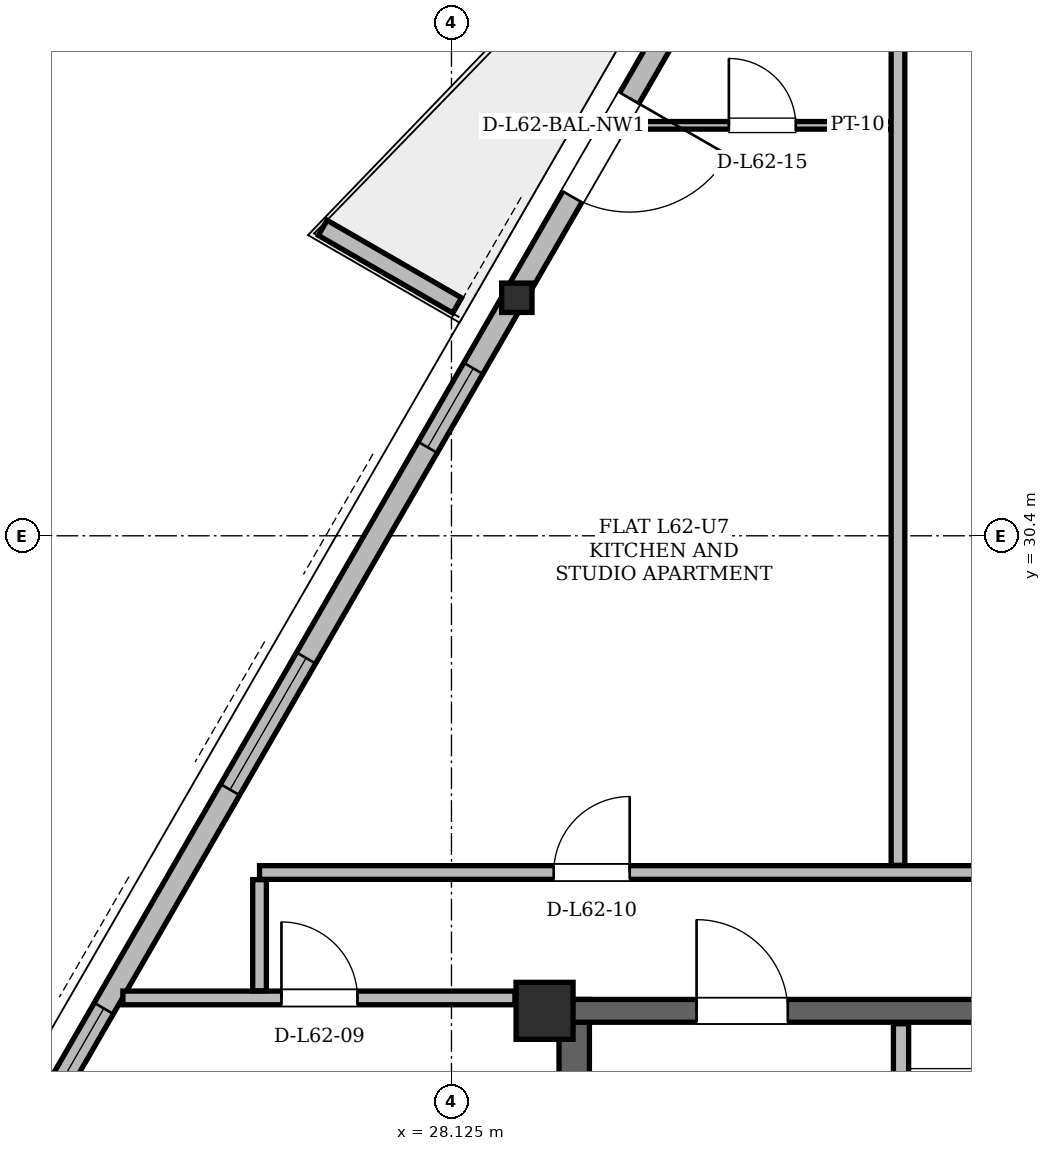
"""IFC4 building model, lengths in metres.
Left out: names, types, materials, properties, quantities, classifications, styles, units other than length and angle.
Written with IfcOpenShell. Run it as: python <this file> out.ifc"""

import sys

from ifc_helpers import new_model, si_unit, direction, frame, frame_2d, origin, origin_2d, place, context, subcontext, project, spatial, polyline, rectangle, hollow_rectangle, i_section, outline, extrude, element, fill, save


model = new_model("IFC4")
c1 = context("Model", 3, precision=1e-05, world=origin(), true_north=direction((0.0, 1.0)))
c2 = subcontext(c1, "Body", "Model", "MODEL_VIEW")
j1 = project(units=[si_unit("LENGTHUNIT", "METRE"), si_unit("PLANEANGLEUNIT", "RADIAN")], contexts=[c1])
p1 = place(None, origin())
s1 = spatial("IfcSite", under=j1, at=p1, CompositionType="ELEMENT")
p2 = place(p1, origin())
s2 = spatial("IfcBuilding", under=s1, at=p2, CompositionType="ELEMENT")
p3 = place(p2, frame((0.0, 0.0, 234.3)))
s3 = spatial("IfcBuildingStorey", under=s2, at=p3, CompositionType="ELEMENT", Elevation=234.3)
p4 = place(p3, frame((29.35, 24.15, 0.0), z_axis=(0.0, 0.0, 1.0), x_axis=(1.0, 0.0, 0.0)))
e1 = element("IfcColumn", 1, at=p4, inside=s3, PredefinedType="COLUMN", context=c2, shape_type="SweptSolid", body=[
    extrude(hollow_rectangle(XDim=0.75, YDim=0.75, WallThickness=0.06, at=origin_2d()), origin(), (0.0, 0.0, 1.0), 3.6),
])
p5 = place(p3, frame((28.955, 33.543, 0.004), z_axis=(0.016857685475, -0.006389606591, 0.999837482478), x_axis=(0.354426896262, 0.935083726308, 0.0)))
e2 = element("IfcColumn", 2, at=p5, inside=s3, PredefinedType="COLUMN", context=c2, shape_type="SweptSolid", body=[
    extrude(i_section(OverallWidth=0.399, OverallDepth=0.386, WebThickness=0.021, FlangeThickness=0.033, at=origin_2d()), origin(), (0.0, 0.0, 1.0), 3.592),
])
p6 = place(p3, frame((29.74, 11.0, 0.0), z_axis=(0.0, 0.0, 1.0), x_axis=(0.0, 1.0, 0.0)))
e3 = element("IfcWall", 3, at=p6, inside=s3, PredefinedType="SHEAR", context=c2, shape_type="SweptSolid", body=[
    extrude(rectangle(XDim=13.3, YDim=0.4, at=frame_2d((6.65, 0.0))), origin(), (0.0, 0.0, 1.0), 3.38),
])
p7 = place(p3, frame((29.65, 24.15, 0.0), z_axis=(0.0, 0.0, 1.0), x_axis=(1.0, 0.0, 0.0)))
e4 = element("IfcWall", 4, at=p7, inside=s3, PredefinedType="SHEAR", context=c2, shape_type="SweptSolid", body=[
    extrude(rectangle(XDim=15.7, YDim=0.3, at=frame_2d((7.85, 0.0))), origin(), (0.0, 0.0, 1.0), 3.38),
])
p8 = place(p7, frame((1.7, 0.0, 0.0)))
e5 = element("IfcOpeningElement", 5, at=p8, cuts=e4, PredefinedType="OPENING", context=c2, shape_type="SweptSolid", body=[
    extrude(rectangle(XDim=1.2, YDim=2.2, at=frame_2d((0.6, 1.1))), frame((0.0, 0.15, 0.0), z_axis=(0.0, -1.0, 0.0), x_axis=(1.0, 0.0, 0.0)), (0.0, 0.0, 1.0), 0.3),
])
p9 = place(p7, frame((12.8, 0.0, 0.0)))
e6 = element("IfcOpeningElement", 6, at=p9, cuts=e4, PredefinedType="OPENING", context=c2, shape_type="SweptSolid", body=[
    extrude(rectangle(XDim=1.2, YDim=2.2, at=frame_2d((0.6, 1.1))), frame((0.0, 0.15, 0.0), z_axis=(0.0, -1.0, 0.0), x_axis=(1.0, 0.0, 0.0)), (0.0, 0.0, 1.0), 0.3),
])
p10 = place(p7, frame((7.4, 0.0, 0.0)))
e7 = element("IfcOpeningElement", 7, at=p10, cuts=e4, PredefinedType="OPENING", context=c2, shape_type="SweptSolid", body=[
    extrude(rectangle(XDim=0.9, YDim=2.05, at=frame_2d((0.45, 1.025))), frame((0.0, 0.15, 0.0), z_axis=(0.0, -1.0, 0.0), x_axis=(1.0, 0.0, 0.0)), (0.0, 0.0, 1.0), 0.3),
])
p11 = place(p3, frame((34.482, 43.116, 0.0), z_axis=(0.0, 0.0, 1.0), x_axis=(-0.500000614513, -0.866025048995, 0.0)))
e8 = element("IfcWall", 8, at=p11, inside=s3, PredefinedType="SOLIDWALL", context=c2, shape_type="SweptSolid", body=[
    extrude(rectangle(XDim=36.848, YDim=0.29, at=frame_2d((18.424, 0.0))), origin(), (0.0, 0.0, 1.0), 2.677),
])
p12 = place(p11, frame((8.034, 0.0, 0.0)))
e9 = element("IfcOpeningElement", 9, at=p12, cuts=e8, PredefinedType="OPENING", context=c2, shape_type="SweptSolid", body=[
    extrude(rectangle(XDim=1.5, YDim=2.2, at=frame_2d((0.75, 1.1))), frame((0.0, 0.145, 0.0), z_axis=(0.0, -1.0, 0.0), x_axis=(1.0, 0.0, 0.0)), (0.0, 0.0, 1.0), 0.29),
])
p13 = place(p11, frame((28.559, 0.0, 0.0)))
e10 = element("IfcOpeningElement", 10, at=p13, cuts=e8, PredefinedType="OPENING", context=c2, shape_type="SweptSolid", body=[
    extrude(rectangle(XDim=1.5, YDim=2.2, at=frame_2d((0.75, 1.1))), frame((0.0, 0.145, 0.0), z_axis=(0.0, -1.0, 0.0), x_axis=(1.0, 0.0, 0.0)), (0.0, 0.0, 1.0), 0.29),
])
p14 = place(p11, frame((21.863, 0.0, 0.85)))
e11 = element("IfcOpeningElement", 11, at=p14, cuts=e8, PredefinedType="OPENING", context=c2, shape_type="SweptSolid", body=[
    extrude(rectangle(XDim=2.4, YDim=1.717, at=frame_2d((1.2, 0.858))), frame((0.0, 0.145, 0.0), z_axis=(0.0, -1.0, 0.0), x_axis=(1.0, 0.0, 0.0)), (0.0, 0.0, 1.0), 0.29),
])
p15 = place(p11, frame((34.677, 0.0, 0.85)))
e12 = element("IfcOpeningElement", 12, at=p15, cuts=e8, PredefinedType="OPENING", context=c2, shape_type="SweptSolid", body=[
    extrude(rectangle(XDim=1.2, YDim=1.48, at=frame_2d((0.6, 0.74))), frame((0.0, 0.145, 0.0), z_axis=(0.0, -1.0, 0.0), x_axis=(1.0, 0.0, 0.0)), (0.0, 0.0, 1.0), 0.29),
])
p16 = place(p11, frame((32.477, 0.0, 0.85)))
e13 = element("IfcOpeningElement", 13, at=p16, cuts=e8, PredefinedType="OPENING", context=c2, shape_type="SweptSolid", body=[
    extrude(rectangle(XDim=1.4, YDim=1.6, at=frame_2d((0.7, 0.8))), frame((0.0, 0.145, 0.0), z_axis=(0.0, -1.0, 0.0), x_axis=(1.0, 0.0, 0.0)), (0.0, 0.0, 1.0), 0.29),
])
p17 = place(p11, frame((12.14, 0.0, 0.85)))
e14 = element("IfcOpeningElement", 14, at=p17, cuts=e8, PredefinedType="OPENING", context=c2, shape_type="SweptSolid", body=[
    extrude(rectangle(XDim=1.2, YDim=1.48, at=frame_2d((0.6, 0.74))), frame((0.0, 0.145, 0.0), z_axis=(0.0, -1.0, 0.0), x_axis=(1.0, 0.0, 0.0)), (0.0, 0.0, 1.0), 0.29),
])
p18 = place(p11, frame((16.54, 0.0, 0.85)))
e15 = element("IfcOpeningElement", 15, at=p18, cuts=e8, PredefinedType="OPENING", context=c2, shape_type="SweptSolid", body=[
    extrude(rectangle(XDim=2.0, YDim=1.717, at=frame_2d((1.0, 0.858))), frame((0.0, 0.145, 0.0), z_axis=(0.0, -1.0, 0.0), x_axis=(1.0, 0.0, 0.0)), (0.0, 0.0, 1.0), 0.29),
])
p19 = place(p11, frame((2.059, 0.0, 0.85)))
e16 = element("IfcOpeningElement", 16, at=p19, cuts=e8, PredefinedType="OPENING", context=c2, shape_type="SweptSolid", body=[
    extrude(rectangle(XDim=1.2, YDim=1.48, at=frame_2d((0.6, 0.74))), frame((0.0, 0.145, 0.0), z_axis=(0.0, -1.0, 0.0), x_axis=(1.0, 0.0, 0.0)), (0.0, 0.0, 1.0), 0.29),
])
p20 = place(p3, frame((28.2, 33.431, 0.0), z_axis=(0.0, 0.0, 1.0), x_axis=(-0.866012356593, 0.500022597718, 0.0)))
e17 = element("IfcWall", 17, at=p20, inside=s3, PredefinedType="PARAPET", context=c2, shape_type="SweptSolid", body=[
    extrude(outline(polyline([(0.0, 0.0), (2.042, 0.0), (2.042, 1.1), (0.0, 1.32), (0.0, 0.0)])), frame((0.0, 0.115, 0.0), z_axis=(0.0, -1.0, 0.0), x_axis=(1.0, 0.0, 0.0)), (0.0, 0.0, 1.0), 0.23),
])
p21 = place(p3, frame((34.04, 19.48, 0.0), z_axis=(0.0, 0.0, 1.0), x_axis=(0.0, 1.0, 0.0)))
e18 = element("IfcWall", 18, at=p21, inside=s3, PredefinedType="PARTITIONING", context=c2, shape_type="SweptSolid", body=[
    extrude(rectangle(XDim=4.5, YDim=0.2, at=frame_2d((2.25, 0.0))), origin(), (0.0, 0.0, 1.0), 3.38),
])
p22 = place(p21, frame((2.12, 0.0, 0.0)))
e19 = element("IfcOpeningElement", 19, at=p22, cuts=e18, PredefinedType="OPENING", context=c2, shape_type="SweptSolid", body=[
    extrude(rectangle(XDim=1.1, YDim=2.2, at=frame_2d((0.55, 1.1))), frame((0.0, 0.1, 0.0), z_axis=(0.0, -1.0, 0.0), x_axis=(1.0, 0.0, 0.0)), (0.0, 0.0, 1.0), 0.2),
])
p23 = place(p3, frame((23.802, 24.32, 0.0), z_axis=(0.0, 0.0, 1.0), x_axis=(1.0, 0.0, 0.0)))
e20 = element("IfcWall", 20, at=p23, inside=s3, PredefinedType="PARTITIONING", context=c2, shape_type="SweptSolid", body=[
    extrude(rectangle(XDim=5.158, YDim=0.18, at=frame_2d((2.579, 0.0))), origin(), (0.0, 0.0, 1.0), 3.38),
])
p24 = place(p23, frame((2.086, 0.0, 0.0)))
e21 = element("IfcOpeningElement", 21, at=p24, cuts=e20, PredefinedType="OPENING", context=c2, shape_type="SweptSolid", body=[
    extrude(rectangle(XDim=1.0, YDim=2.18, at=frame_2d((0.5, 1.09))), frame((0.0, 0.09, 0.0), z_axis=(0.0, -1.0, 0.0), x_axis=(1.0, 0.0, 0.0)), (0.0, 0.0, 1.0), 0.18),
])
p25 = place(p3, frame((25.6, 25.97, 0.0), z_axis=(0.0, 0.0, 1.0), x_axis=(1.0, 0.0, 0.0)))
e22 = element("IfcWall", 22, at=p25, inside=s3, PredefinedType="PARTITIONING", context=c2, shape_type="SweptSolid", body=[
    extrude(rectangle(XDim=21.85, YDim=0.18, at=frame_2d((10.925, 0.0))), origin(), (0.0, 0.0, 1.0), 2.913),
])
p26 = place(p25, frame((3.87, 0.0, 0.0)))
e23 = element("IfcOpeningElement", 23, at=p26, cuts=e22, PredefinedType="OPENING", context=c2, shape_type="SweptSolid", body=[
    extrude(rectangle(XDim=1.0, YDim=2.18, at=frame_2d((0.5, 1.09))), frame((0.0, 0.09, 0.0), z_axis=(0.0, -1.0, 0.0), x_axis=(1.0, 0.0, 0.0)), (0.0, 0.0, 1.0), 0.18),
])
p27 = place(p25, frame((9.833, 0.0, 0.0)))
e24 = element("IfcOpeningElement", 24, at=p27, cuts=e22, PredefinedType="OPENING", context=c2, shape_type="SweptSolid", body=[
    extrude(rectangle(XDim=1.0, YDim=2.18, at=frame_2d((0.5, 1.09))), frame((0.0, 0.09, 0.0), z_axis=(0.0, -1.0, 0.0), x_axis=(1.0, 0.0, 0.0)), (0.0, 0.0, 1.0), 0.18),
])
p28 = place(p25, frame((15.35, 0.0, 0.0)))
e25 = element("IfcOpeningElement", 25, at=p28, cuts=e22, PredefinedType="OPENING", context=c2, shape_type="SweptSolid", body=[
    extrude(rectangle(XDim=1.3, YDim=2.2, at=frame_2d((0.65, 1.1))), frame((0.0, 0.09, 0.0), z_axis=(0.0, -1.0, 0.0), x_axis=(1.0, 0.0, 0.0)), (0.0, 0.0, 1.0), 0.18),
])
p29 = place(p25, frame((18.94, 0.0, 0.0)))
e26 = element("IfcOpeningElement", 26, at=p29, cuts=e22, PredefinedType="OPENING", context=c2, shape_type="SweptSolid", body=[
    extrude(rectangle(XDim=1.0, YDim=2.18, at=frame_2d((0.5, 1.09))), frame((0.0, 0.09, 0.0), z_axis=(0.0, -1.0, 0.0), x_axis=(1.0, 0.0, 0.0)), (0.0, 0.0, 1.0), 0.18),
])
p30 = place(p3, frame((30.43, 35.8, 0.0), z_axis=(0.0, 0.0, 1.0), x_axis=(1.0, 0.0, 0.0)))
e27 = element("IfcWall", 27, at=p30, inside=s3, PredefinedType="PARTITIONING", context=c2, shape_type="SweptSolid", body=[
    extrude(rectangle(XDim=3.652, YDim=0.1, at=frame_2d((1.826, 0.0))), origin(), (0.0, 0.0, 1.0), 3.38),
])
p31 = place(p30, frame((1.345, 0.0, 0.0)))
e28 = element("IfcOpeningElement", 28, at=p31, cuts=e27, PredefinedType="OPENING", context=c2, shape_type="SweptSolid", body=[
    extrude(rectangle(XDim=0.88, YDim=2.08, at=frame_2d((0.44, 1.04))), frame((0.0, 0.05, 0.0), z_axis=(0.0, -1.0, 0.0), x_axis=(1.0, 0.0, 0.0)), (0.0, 0.0, 1.0), 0.1),
])
p32 = place(p3, frame((25.6, 24.414, 0.0), z_axis=(0.0, 0.0, 1.0), x_axis=(0.0, 1.0, 0.0)))
e29 = element("IfcWall", 29, at=p32, inside=s3, PredefinedType="PARTITIONING", context=c2, shape_type="SweptSolid", body=[
    extrude(rectangle(XDim=1.462, YDim=0.18, at=frame_2d((0.731, 0.0))), origin(), (0.0, 0.0, 1.0), 3.38),
])
p33 = place(p3, frame((34.0, 26.064, 0.0), z_axis=(0.0, 0.0, 1.0), x_axis=(0.0, 1.0, 0.0)))
e30 = element("IfcWall", 30, at=p33, inside=s3, PredefinedType="PARTITIONING", context=c2, shape_type="SweptSolid", body=[
    extrude(rectangle(XDim=15.919, YDim=0.18, at=frame_2d((7.959, 0.0))), origin(), (0.0, 0.0, 1.0), 2.913),
])
p34 = place(p12, origin())
e31 = element("IfcDoor", 31, at=p34, inside=s3, OperationType="SINGLE_SWING_LEFT", PredefinedType="DOOR", context=c2, shape_type="SweptSolid", body=[
    extrude(rectangle(XDim=1.5, YDim=2.2, at=frame_2d((0.75, 1.1))), frame((0.0, 0.025, 0.0), z_axis=(0.0, -1.0, 0.0), x_axis=(1.0, 0.0, 0.0)), (0.0, 0.0, 1.0), 0.05),
])
fill(e9, e31)
p35 = place(p14, origin())
e32 = element("IfcWindow", 32, at=p35, inside=s3, PartitioningType="SINGLE_PANEL", PredefinedType="WINDOW", context=c2, shape_type="SweptSolid", body=[
    extrude(rectangle(XDim=2.4, YDim=1.717, at=frame_2d((1.2, 0.858))), frame((0.0, 0.03, 0.0), z_axis=(0.0, -1.0, 0.0), x_axis=(1.0, 0.0, 0.0)), (0.0, 0.0, 1.0), 0.06),
])
fill(e11, e32)
p36 = place(p17, origin())
e33 = element("IfcWindow", 33, at=p36, inside=s3, PartitioningType="SINGLE_PANEL", PredefinedType="WINDOW", context=c2, shape_type="SweptSolid", body=[
    extrude(rectangle(XDim=1.2, YDim=1.48, at=frame_2d((0.6, 0.74))), frame((0.0, 0.03, 0.0), z_axis=(0.0, -1.0, 0.0), x_axis=(1.0, 0.0, 0.0)), (0.0, 0.0, 1.0), 0.06),
])
fill(e14, e33)
p37 = place(p18, origin())
e34 = element("IfcWindow", 34, at=p37, inside=s3, PartitioningType="SINGLE_PANEL", PredefinedType="WINDOW", context=c2, shape_type="SweptSolid", body=[
    extrude(rectangle(XDim=2.0, YDim=1.717, at=frame_2d((1.0, 0.858))), frame((0.0, 0.03, 0.0), z_axis=(0.0, -1.0, 0.0), x_axis=(1.0, 0.0, 0.0)), (0.0, 0.0, 1.0), 0.06),
])
fill(e15, e34)
p38 = place(p8, origin())
e35 = element("IfcDoor", 35, at=p38, inside=s3, OperationType="SINGLE_SWING_LEFT", PredefinedType="DOOR", context=c2, shape_type="SweptSolid", body=[
    extrude(rectangle(XDim=1.2, YDim=2.2, at=frame_2d((0.6, 1.1))), frame((0.0, 0.025, 0.0), z_axis=(0.0, -1.0, 0.0), x_axis=(1.0, 0.0, 0.0)), (0.0, 0.0, 1.0), 0.05),
])
fill(e5, e35)
p39 = place(p24, origin())
e36 = element("IfcDoor", 36, at=p39, inside=s3, OperationType="SINGLE_SWING_LEFT", PredefinedType="DOOR", context=c2, shape_type="SweptSolid", body=[
    extrude(rectangle(XDim=1.0, YDim=2.18, at=frame_2d((0.5, 1.09))), frame((0.0, 0.025, 0.0), z_axis=(0.0, -1.0, 0.0), x_axis=(1.0, 0.0, 0.0)), (0.0, 0.0, 1.0), 0.05),
])
fill(e21, e36)
p40 = place(p26, origin())
e37 = element("IfcDoor", 37, at=p40, inside=s3, OperationType="SINGLE_SWING_RIGHT", PredefinedType="DOOR", context=c2, shape_type="SweptSolid", body=[
    extrude(rectangle(XDim=1.0, YDim=2.18, at=frame_2d((0.5, 1.09))), frame((0.0, 0.025, 0.0), z_axis=(0.0, -1.0, 0.0), x_axis=(1.0, 0.0, 0.0)), (0.0, 0.0, 1.0), 0.05),
])
fill(e23, e37)
p41 = place(p31, origin())
e38 = element("IfcDoor", 38, at=p41, inside=s3, OperationType="SINGLE_SWING_LEFT", PredefinedType="DOOR", context=c2, shape_type="SweptSolid", body=[
    extrude(rectangle(XDim=0.88, YDim=2.08, at=frame_2d((0.44, 1.04))), frame((0.0, 0.025, 0.0), z_axis=(0.0, -1.0, 0.0), x_axis=(1.0, 0.0, 0.0)), (0.0, 0.0, 1.0), 0.05),
])
fill(e28, e38)
save(model, sys.argv[1])
